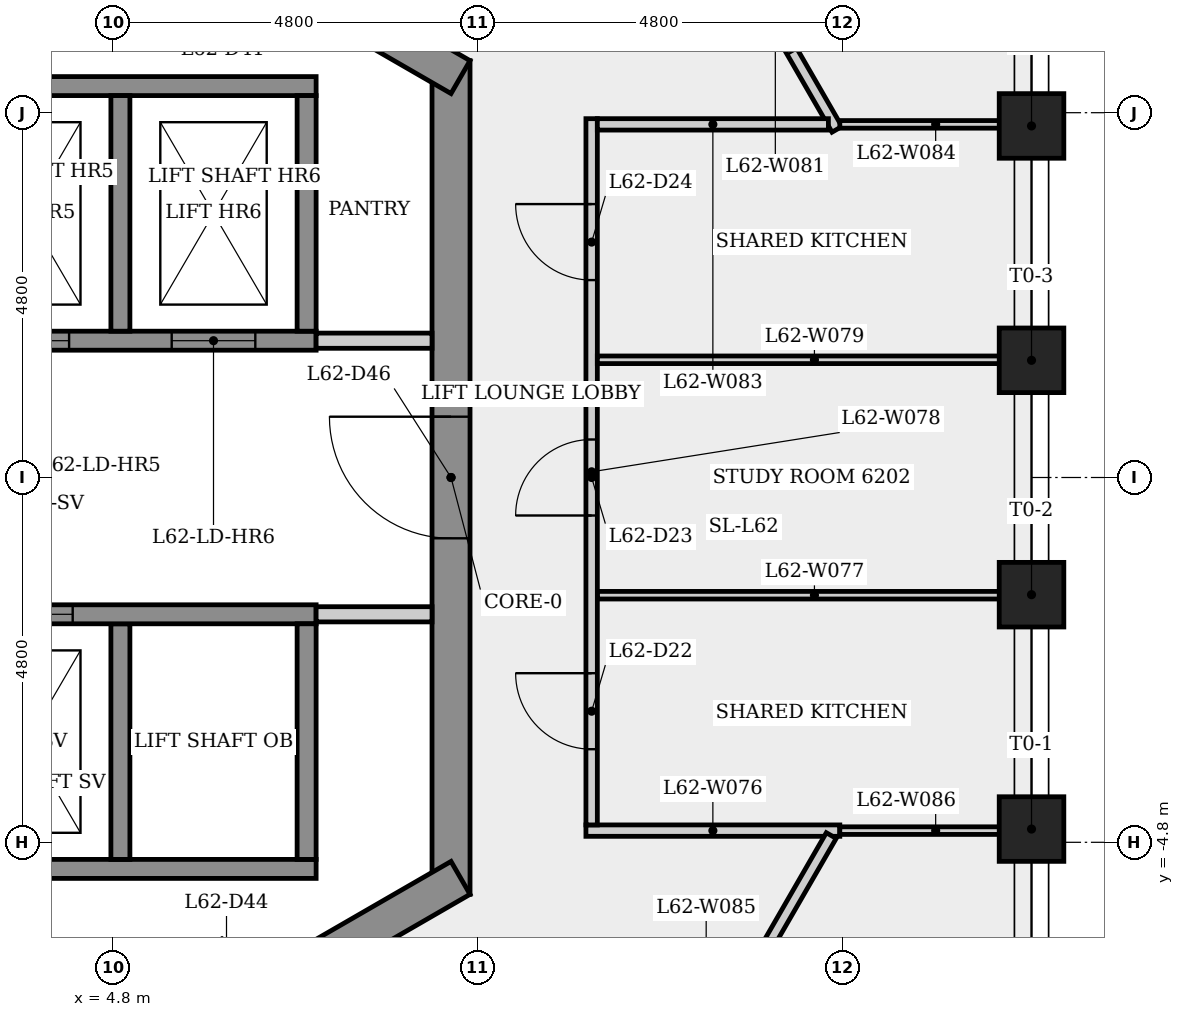
"""IFC4 building model, lengths in metres.
Left out: names, types, materials, properties, quantities, classifications, styles, units other than length and angle.
Written with IfcOpenShell. Run it as: python <this file> out.ifc"""

import sys

from ifc_helpers import new_model, si_unit, direction, frame, frame_2d, origin, origin_2d, place, context, subcontext, project, spatial, rectangle, extrude, element, fill, save


model = new_model("IFC4")
c1 = context("Model", 3, precision=1e-05, world=origin(), true_north=direction((0.0, 1.0)))
c2 = subcontext(c1, "Body", "Model", "MODEL_VIEW")
j1 = project(units=[si_unit("LENGTHUNIT", "METRE"), si_unit("PLANEANGLEUNIT", "RADIAN")], contexts=[c1])
p1 = place(None, origin())
s1 = spatial("IfcSite", under=j1, at=p1, CompositionType="ELEMENT")
p2 = place(p1, origin())
s2 = spatial("IfcBuilding", under=s1, at=p2, CompositionType="ELEMENT")
p3 = place(p2, frame((0.0, 0.0, 232.5)))
s3 = spatial("IfcBuildingStorey", under=s2, at=p3, CompositionType="ELEMENT", Elevation=232.5)
p4 = place(p3, frame((9.25, -5.485, 0.0), z_axis=(0.0, 0.0, 1.0), x_axis=(0.0, 1.0, 0.0)))
e1 = element("IfcWall", 1, at=p4, inside=s3, PredefinedType="SHEAR", context=c2, shape_type="SweptSolid", body=[
    extrude(rectangle(XDim=10.97, YDim=0.5, at=frame_2d((5.485, 0.0))), origin(), (0.0, 0.0, 1.0), 3.4),
])
p5 = place(p4, frame((4.685, 0.0, 0.0)))
e2 = element("IfcOpeningElement", 2, at=p5, cuts=e1, PredefinedType="OPENING", context=c2, shape_type="SweptSolid", body=[
    extrude(rectangle(XDim=1.6, YDim=2.1, at=frame_2d((0.8, 1.05))), frame((0.0, 0.26, 0.0), z_axis=(0.0, -1.0, 0.0), x_axis=(1.0, 0.0, 0.0)), (0.0, 0.0, 1.0), 0.52),
])
p6 = place(p3, frame((9.375, 5.268, 0.0), z_axis=(0.0, 0.0, 1.0), x_axis=(-0.866023993627, 0.500002442456, 0.0)))
e3 = element("IfcWall", 3, at=p6, inside=s3, PredefinedType="SHEAR", context=c2, shape_type="SweptSolid", body=[
    extrude(rectangle(XDim=10.97, YDim=0.5, at=frame_2d((5.485, 0.0))), origin(), (0.0, 0.0, 1.0), 3.4),
])
p7 = place(p6, frame((8.383, 0.0, 0.0)))
e4 = element("IfcOpeningElement", 4, at=p7, cuts=e3, PredefinedType="OPENING", context=c2, shape_type="SweptSolid", body=[
    extrude(rectangle(XDim=0.9, YDim=2.1, at=frame_2d((0.45, 1.05))), frame((0.0, 0.26, 0.0), z_axis=(0.0, -1.0, 0.0), x_axis=(1.0, 0.0, 0.0)), (0.0, 0.0, 1.0), 0.52),
])
p8 = place(p6, frame((3.165, 0.0, 0.0)))
e5 = element("IfcOpeningElement", 5, at=p8, cuts=e3, PredefinedType="OPENING", context=c2, shape_type="SweptSolid", body=[
    extrude(rectangle(XDim=0.9, YDim=2.1, at=frame_2d((0.45, 1.05))), frame((0.0, 0.26, 0.0), z_axis=(0.0, -1.0, 0.0), x_axis=(1.0, 0.0, 0.0)), (0.0, 0.0, 1.0), 0.52),
])
p9 = place(p3, frame((-0.125, -10.753, 0.0), z_axis=(0.0, 0.0, 1.0), x_axis=(0.866023993627, 0.500002442456, 0.0)))
e6 = element("IfcWall", 6, at=p9, inside=s3, PredefinedType="SHEAR", context=c2, shape_type="SweptSolid", body=[
    extrude(rectangle(XDim=10.97, YDim=0.5, at=frame_2d((5.485, 0.0))), origin(), (0.0, 0.0, 1.0), 3.4),
])
p10 = place(p9, frame((6.964, 0.0, 0.0)))
e7 = element("IfcOpeningElement", 7, at=p10, cuts=e6, PredefinedType="OPENING", context=c2, shape_type="SweptSolid", body=[
    extrude(rectangle(XDim=0.9, YDim=2.1, at=frame_2d((0.45, 1.05))), frame((0.0, 0.26, 0.0), z_axis=(0.0, -1.0, 0.0), x_axis=(1.0, 0.0, 0.0)), (0.0, 0.0, 1.0), 0.52),
])
for number, where, z_axis, x_axis in (
    (8, (16.887, -4.626, 0.0), (0.0, 0.0, 1.0), (1.0, 0.0, 0.0)),
    (9, (16.887, -1.542, 0.0), (0.0, 0.0, 1.0), (1.0, 0.0, 0.0)),
    (10, (16.887, 1.542, 0.0), (0.0, 0.0, 1.0), (1.0, 0.0, 0.0)),
    (11, (16.887, 4.626, 0.0), (0.0, 0.0, 1.0), (1.0, 0.0, 0.0)),
):
    element("IfcColumn", number, at=place(p3, frame(where, z_axis=z_axis, x_axis=x_axis)), inside=s3, PredefinedType="COLUMN", context=c2, shape_type="SweptSolid", body=[
        extrude(rectangle(XDim=0.85, YDim=0.85, at=origin_2d()), origin(), (0.0, 0.0, 1.0), 3.4),
    ])
p11 = place(p3, frame((-7.475, 1.8, 0.0), z_axis=(0.0, 0.0, 1.0), x_axis=(1.0, 0.0, 0.0)))
e12 = element("IfcWall", 12, at=p11, inside=s3, PredefinedType="SHEAR", context=c2, shape_type="SweptSolid", body=[
    extrude(rectangle(XDim=14.95, YDim=0.25, at=frame_2d((7.475, 0.0))), origin(), (0.0, 0.0, 1.0), 3.05),
])
p12 = place(p11, frame((0.8, 0.0, 0.0)))
e13 = element("IfcOpeningElement", 13, at=p12, cuts=e12, PredefinedType="OPENING", context=c2, shape_type="SweptSolid", body=[
    extrude(rectangle(XDim=1.1, YDim=2.1, at=frame_2d((0.55, 1.05))), frame((0.0, 0.135, 0.0), z_axis=(0.0, -1.0, 0.0), x_axis=(1.0, 0.0, 0.0)), (0.0, 0.0, 1.0), 0.27),
])
p13 = place(p11, frame((3.25, 0.0, 0.0)))
e14 = element("IfcOpeningElement", 14, at=p13, cuts=e12, PredefinedType="OPENING", context=c2, shape_type="SweptSolid", body=[
    extrude(rectangle(XDim=1.1, YDim=2.1, at=frame_2d((0.55, 1.05))), frame((0.0, 0.135, 0.0), z_axis=(0.0, -1.0, 0.0), x_axis=(1.0, 0.0, 0.0)), (0.0, 0.0, 1.0), 0.27),
])
p14 = place(p11, frame((5.7, 0.0, 0.0)))
e15 = element("IfcOpeningElement", 15, at=p14, cuts=e12, PredefinedType="OPENING", context=c2, shape_type="SweptSolid", body=[
    extrude(rectangle(XDim=1.1, YDim=2.1, at=frame_2d((0.55, 1.05))), frame((0.0, 0.135, 0.0), z_axis=(0.0, -1.0, 0.0), x_axis=(1.0, 0.0, 0.0)), (0.0, 0.0, 1.0), 0.27),
])
p15 = place(p11, frame((8.15, 0.0, 0.0)))
e16 = element("IfcOpeningElement", 16, at=p15, cuts=e12, PredefinedType="OPENING", context=c2, shape_type="SweptSolid", body=[
    extrude(rectangle(XDim=1.1, YDim=2.1, at=frame_2d((0.55, 1.05))), frame((0.0, 0.135, 0.0), z_axis=(0.0, -1.0, 0.0), x_axis=(1.0, 0.0, 0.0)), (0.0, 0.0, 1.0), 0.27),
])
p16 = place(p11, frame((10.6, 0.0, 0.0)))
e17 = element("IfcOpeningElement", 17, at=p16, cuts=e12, PredefinedType="OPENING", context=c2, shape_type="SweptSolid", body=[
    extrude(rectangle(XDim=1.1, YDim=2.1, at=frame_2d((0.55, 1.05))), frame((0.0, 0.135, 0.0), z_axis=(0.0, -1.0, 0.0), x_axis=(1.0, 0.0, 0.0)), (0.0, 0.0, 1.0), 0.27),
])
p17 = place(p11, frame((13.05, 0.0, 0.0)))
e18 = element("IfcOpeningElement", 18, at=p17, cuts=e12, PredefinedType="OPENING", context=c2, shape_type="SweptSolid", body=[
    extrude(rectangle(XDim=1.1, YDim=2.1, at=frame_2d((0.55, 1.05))), frame((0.0, 0.135, 0.0), z_axis=(0.0, -1.0, 0.0), x_axis=(1.0, 0.0, 0.0)), (0.0, 0.0, 1.0), 0.27),
])
p18 = place(p3, frame((-7.225, 5.15, 0.0), z_axis=(0.0, 0.0, 1.0), x_axis=(1.0, 0.0, 0.0)))
e19 = element("IfcWall", 19, at=p18, inside=s3, PredefinedType="SHEAR", context=c2, shape_type="SweptSolid", body=[
    extrude(rectangle(XDim=14.7, YDim=0.25, at=frame_2d((7.35, 0.0))), origin(), (0.0, 0.0, 1.0), 3.05),
])
p19 = place(p3, frame((2.575, -5.15, 0.0), z_axis=(0.0, 0.0, 1.0), x_axis=(1.0, 0.0, 0.0)))
e20 = element("IfcWall", 20, at=p19, inside=s3, PredefinedType="SHEAR", context=c2, shape_type="SweptSolid", body=[
    extrude(rectangle(XDim=4.9, YDim=0.25, at=frame_2d((2.45, 0.0))), origin(), (0.0, 0.0, 1.0), 3.05),
])
for number, where, z_axis, x_axis in (
    (21, (4.9, -1.925, 0.0), (0.0, 0.0, 1.0), (0.0, -1.0, 0.0)),
    (22, (4.9, 5.025, 0.0), (0.0, 0.0, 1.0), (0.0, -1.0, 0.0)),
):
    element("IfcWall", number, at=place(p3, frame(where, z_axis=z_axis, x_axis=x_axis)), inside=s3, PredefinedType="SHEAR", context=c2, shape_type="SweptSolid", body=[
        extrude(rectangle(XDim=3.1, YDim=0.25, at=frame_2d((1.55, 0.0))), origin(), (0.0, 0.0, 1.0), 3.4),
    ])
p20 = place(p3, frame((2.575, -1.8, 0.0), z_axis=(0.0, 0.0, 1.0), x_axis=(1.0, 0.0, 0.0)))
e23 = element("IfcWall", 23, at=p20, inside=s3, PredefinedType="SHEAR", context=c2, shape_type="SweptSolid", body=[
    extrude(rectangle(XDim=4.9, YDim=0.25, at=frame_2d((2.45, 0.0))), origin(), (0.0, 0.0, 1.0), 3.05),
])
p21 = place(p20, frame((0.597, 0.0, 0.0)))
e24 = element("IfcOpeningElement", 24, at=p21, cuts=e23, PredefinedType="OPENING", context=c2, shape_type="SweptSolid", body=[
    extrude(rectangle(XDim=1.1, YDim=2.1, at=frame_2d((0.55, 1.05))), frame((0.0, 0.135, 0.0), z_axis=(0.0, -1.0, 0.0), x_axis=(1.0, 0.0, 0.0)), (0.0, 0.0, 1.0), 0.27),
])
p22 = place(p3, frame((7.475, 1.8, 0.0), z_axis=(0.0, 0.0, 1.0), x_axis=(1.0, 0.0, 0.0)))
e25 = element("IfcWall", 25, at=p22, inside=s3, PredefinedType="PARTITIONING", context=c2, shape_type="SweptSolid", body=[
    extrude(rectangle(XDim=1.525, YDim=0.2, at=frame_2d((0.763, 0.0))), origin(), (0.0, 0.0, 1.0), 3.05),
])
for number, where, z_axis, x_axis in (
    (26, (7.35, -1.925, 0.0), (0.0, 0.0, 1.0), (0.0, -1.0, 0.0)),
    (27, (7.35, 5.025, 0.0), (0.0, 0.0, 1.0), (0.0, -1.0, 0.0)),
):
    element("IfcWall", number, at=place(p3, frame(where, z_axis=z_axis, x_axis=x_axis)), inside=s3, PredefinedType="SHEAR", context=c2, shape_type="SweptSolid", body=[
        extrude(rectangle(XDim=3.1, YDim=0.25, at=frame_2d((1.55, 0.0))), origin(), (0.0, 0.0, 1.0), 3.4),
    ])
p23 = place(p3, frame((9.0, -1.8, 0.0), z_axis=(0.0, 0.0, 1.0), x_axis=(-1.0, 0.0, 0.0)))
e28 = element("IfcWall", 28, at=p23, inside=s3, PredefinedType="PARTITIONING", context=c2, shape_type="SweptSolid", body=[
    extrude(rectangle(XDim=1.525, YDim=0.2, at=frame_2d((0.763, 0.0))), origin(), (0.0, 0.0, 1.0), 3.05),
])
p24 = place(p3, frame((11.025, -4.646, 0.0), z_axis=(0.0, 0.0, 1.0), x_axis=(1.0, 0.0, 0.0)))
e29 = element("IfcWall", 29, at=p24, inside=s3, PredefinedType="PARTITIONING", context=c2, shape_type="SweptSolid", body=[
    extrude(rectangle(XDim=3.34, YDim=0.15, at=frame_2d((1.67, 0.0))), origin(), (0.0, 0.0, 1.0), 3.05),
])
p25 = place(p3, frame((11.175, -1.549, 0.0), z_axis=(0.0, 0.0, 1.0), x_axis=(1.0, 0.0, 0.0)))
e30 = element("IfcWall", 30, at=p25, inside=s3, PredefinedType="PARTITIONING", context=c2, shape_type="SweptSolid", body=[
    extrude(rectangle(XDim=5.712, YDim=0.1, at=frame_2d((2.856, 0.0))), origin(), (0.0, 0.0, 1.0), 3.05),
])
p26 = place(p3, frame((11.1, -4.571, 0.0), z_axis=(0.0, 0.0, 1.0), x_axis=(0.0, 1.0, 0.0)))
e31 = element("IfcWall", 31, at=p26, inside=s3, PredefinedType="PARTITIONING", context=c2, shape_type="SweptSolid", body=[
    extrude(rectangle(XDim=9.292, YDim=0.15, at=frame_2d((4.646, 0.0))), origin(), (0.0, 0.0, 1.0), 3.05),
])
p27 = place(p26, frame((0.996, 0.0, 0.0)))
e32 = element("IfcOpeningElement", 32, at=p27, cuts=e31, PredefinedType="OPENING", context=c2, shape_type="SweptSolid", body=[
    extrude(rectangle(XDim=1.0, YDim=2.1, at=frame_2d((0.5, 1.05))), frame((0.0, 0.085, 0.0), z_axis=(0.0, -1.0, 0.0), x_axis=(1.0, 0.0, 0.0)), (0.0, 0.0, 1.0), 0.17),
])
p28 = place(p26, frame((4.071, 0.0, 0.0)))
e33 = element("IfcOpeningElement", 33, at=p28, cuts=e31, PredefinedType="OPENING", context=c2, shape_type="SweptSolid", body=[
    extrude(rectangle(XDim=1.0, YDim=2.1, at=frame_2d((0.5, 1.05))), frame((0.0, 0.085, 0.0), z_axis=(0.0, -1.0, 0.0), x_axis=(1.0, 0.0, 0.0)), (0.0, 0.0, 1.0), 0.17),
])
p29 = place(p26, frame((7.169, 0.0, 0.0)))
e34 = element("IfcOpeningElement", 34, at=p29, cuts=e31, PredefinedType="OPENING", context=c2, shape_type="SweptSolid", body=[
    extrude(rectangle(XDim=1.0, YDim=2.1, at=frame_2d((0.5, 1.05))), frame((0.0, 0.085, 0.0), z_axis=(0.0, -1.0, 0.0), x_axis=(1.0, 0.0, 0.0)), (0.0, 0.0, 1.0), 0.17),
])
p30 = place(p3, frame((11.175, 1.549, 0.0), z_axis=(0.0, 0.0, 1.0), x_axis=(1.0, 0.0, 0.0)))
e35 = element("IfcWall", 35, at=p30, inside=s3, PredefinedType="PARTITIONING", context=c2, shape_type="SweptSolid", body=[
    extrude(rectangle(XDim=5.712, YDim=0.1, at=frame_2d((2.856, 0.0))), origin(), (0.0, 0.0, 1.0), 3.05),
])
p31 = place(p3, frame((12.706, 7.391, 0.0), z_axis=(0.0, 0.0, 1.0), x_axis=(0.499967850536, -0.866043964491, 0.0)))
e36 = element("IfcWall", 36, at=p31, inside=s3, PredefinedType="PARTITIONING", context=c2, shape_type="SweptSolid", body=[
    extrude(rectangle(XDim=3.244, YDim=0.15, at=frame_2d((1.622, 0.0))), origin(), (0.0, 0.0, 1.0), 3.05),
])
p32 = place(p31, frame((1.067, 0.0, 0.0)))
e37 = element("IfcOpeningElement", 37, at=p32, cuts=e36, PredefinedType="OPENING", context=c2, shape_type="SweptSolid", body=[
    extrude(rectangle(XDim=1.0, YDim=2.1, at=frame_2d((0.5, 1.05))), frame((0.0, 0.085, 0.0), z_axis=(0.0, -1.0, 0.0), x_axis=(1.0, 0.0, 0.0)), (0.0, 0.0, 1.0), 0.17),
])
p33 = place(p3, frame((14.215, 4.646, 0.0), z_axis=(0.0, 0.0, 1.0), x_axis=(-1.0, 0.0, 0.0)))
e38 = element("IfcWall", 38, at=p33, inside=s3, PredefinedType="PARTITIONING", context=c2, shape_type="SweptSolid", body=[
    extrude(rectangle(XDim=3.04, YDim=0.15, at=frame_2d((1.52, 0.0))), origin(), (0.0, 0.0, 1.0), 3.05),
])
p34 = place(p3, frame((14.365, 4.646, 0.0), z_axis=(0.0, 0.0, 1.0), x_axis=(1.0, 0.0, 0.0)))
e39 = element("IfcWall", 39, at=p34, inside=s3, PredefinedType="PARTITIONING", context=c2, shape_type="SweptSolid", body=[
    extrude(rectangle(XDim=2.522, YDim=0.1, at=frame_2d((1.261, 0.0))), origin(), (0.0, 0.0, 1.0), 3.05),
])
p35 = place(p3, frame((14.253, -4.711, 0.0), z_axis=(0.0, 0.0, 1.0), x_axis=(-0.500008173903, -0.866020684528, 0.0)))
e40 = element("IfcWall", 40, at=p35, inside=s3, PredefinedType="PARTITIONING", context=c2, shape_type="SweptSolid", body=[
    extrude(rectangle(XDim=6.583, YDim=0.15, at=frame_2d((3.292, 0.0))), origin(), (0.0, 0.0, 1.0), 3.05),
])
p36 = place(p35, frame((2.792, 0.0, 0.0)))
e41 = element("IfcOpeningElement", 41, at=p36, cuts=e40, PredefinedType="OPENING", context=c2, shape_type="SweptSolid", body=[
    extrude(rectangle(XDim=1.0, YDim=2.1, at=frame_2d((0.5, 1.05))), frame((0.0, 0.085, 0.0), z_axis=(0.0, -1.0, 0.0), x_axis=(1.0, 0.0, 0.0)), (0.0, 0.0, 1.0), 0.17),
])
p37 = place(p3, frame((16.887, -4.646, 0.0), z_axis=(0.0, 0.0, 1.0), x_axis=(-1.0, 0.0, 0.0)))
e42 = element("IfcWall", 42, at=p37, inside=s3, PredefinedType="PARTITIONING", context=c2, shape_type="SweptSolid", body=[
    extrude(rectangle(XDim=2.522, YDim=0.1, at=frame_2d((1.261, 0.0))), origin(), (0.0, 0.0, 1.0), 3.05),
])
p38 = place(p16, origin())
e43 = element("IfcDoor", 43, at=p38, inside=s3, OperationType="SLIDING_TO_LEFT", PredefinedType="DOOR", context=c2, shape_type="SweptSolid", body=[
    extrude(rectangle(XDim=1.1, YDim=2.1, at=frame_2d((0.55, 1.05))), frame((0.0, 0.025, 0.0), z_axis=(0.0, -1.0, 0.0), x_axis=(1.0, 0.0, 0.0)), (0.0, 0.0, 1.0), 0.05),
])
fill(e17, e43)
p39 = place(p17, origin())
e44 = element("IfcDoor", 44, at=p39, inside=s3, OperationType="SLIDING_TO_LEFT", PredefinedType="DOOR", context=c2, shape_type="SweptSolid", body=[
    extrude(rectangle(XDim=1.1, YDim=2.1, at=frame_2d((0.55, 1.05))), frame((0.0, 0.025, 0.0), z_axis=(0.0, -1.0, 0.0), x_axis=(1.0, 0.0, 0.0)), (0.0, 0.0, 1.0), 0.05),
])
fill(e18, e44)
p40 = place(p21, origin())
e45 = element("IfcDoor", 45, at=p40, inside=s3, OperationType="SLIDING_TO_LEFT", PredefinedType="DOOR", context=c2, shape_type="SweptSolid", body=[
    extrude(rectangle(XDim=1.1, YDim=2.1, at=frame_2d((0.55, 1.05))), frame((0.0, 0.025, 0.0), z_axis=(0.0, -1.0, 0.0), x_axis=(1.0, 0.0, 0.0)), (0.0, 0.0, 1.0), 0.05),
])
fill(e24, e45)
p41 = place(p27, origin())
e46 = element("IfcDoor", 46, at=p41, inside=s3, OperationType="SINGLE_SWING_RIGHT", PredefinedType="DOOR", context=c2, shape_type="SweptSolid", body=[
    extrude(rectangle(XDim=1.0, YDim=2.1, at=frame_2d((0.5, 1.05))), frame((0.0, 0.025, 0.0), z_axis=(0.0, -1.0, 0.0), x_axis=(1.0, 0.0, 0.0)), (0.0, 0.0, 1.0), 0.05),
])
fill(e32, e46)
p42 = place(p28, origin())
e47 = element("IfcDoor", 47, at=p42, inside=s3, OperationType="SINGLE_SWING_LEFT", PredefinedType="DOOR", context=c2, shape_type="SweptSolid", body=[
    extrude(rectangle(XDim=1.0, YDim=2.1, at=frame_2d((0.5, 1.05))), frame((0.0, 0.025, 0.0), z_axis=(0.0, -1.0, 0.0), x_axis=(1.0, 0.0, 0.0)), (0.0, 0.0, 1.0), 0.05),
])
fill(e33, e47)
p43 = place(p29, origin())
e48 = element("IfcDoor", 48, at=p43, inside=s3, OperationType="SINGLE_SWING_RIGHT", PredefinedType="DOOR", context=c2, shape_type="SweptSolid", body=[
    extrude(rectangle(XDim=1.0, YDim=2.1, at=frame_2d((0.5, 1.05))), frame((0.0, 0.025, 0.0), z_axis=(0.0, -1.0, 0.0), x_axis=(1.0, 0.0, 0.0)), (0.0, 0.0, 1.0), 0.05),
])
fill(e34, e48)
p44 = place(p32, origin())
e49 = element("IfcDoor", 49, at=p44, inside=s3, OperationType="SINGLE_SWING_LEFT", PredefinedType="DOOR", context=c2, shape_type="SweptSolid", body=[
    extrude(rectangle(XDim=1.0, YDim=2.1, at=frame_2d((0.5, 1.05))), frame((0.0, 0.025, 0.0), z_axis=(0.0, -1.0, 0.0), x_axis=(1.0, 0.0, 0.0)), (0.0, 0.0, 1.0), 0.05),
])
fill(e37, e49)
p45 = place(p5, origin())
e50 = element("IfcDoor", 50, at=p45, inside=s3, OperationType="SINGLE_SWING_RIGHT", PredefinedType="DOOR", context=c2, shape_type="SweptSolid", body=[
    extrude(rectangle(XDim=1.6, YDim=2.1, at=frame_2d((0.8, 1.05))), frame((0.0, 0.025, 0.0), z_axis=(0.0, -1.0, 0.0), x_axis=(1.0, 0.0, 0.0)), (0.0, 0.0, 1.0), 0.05),
])
fill(e2, e50)
save(model, sys.argv[1])
